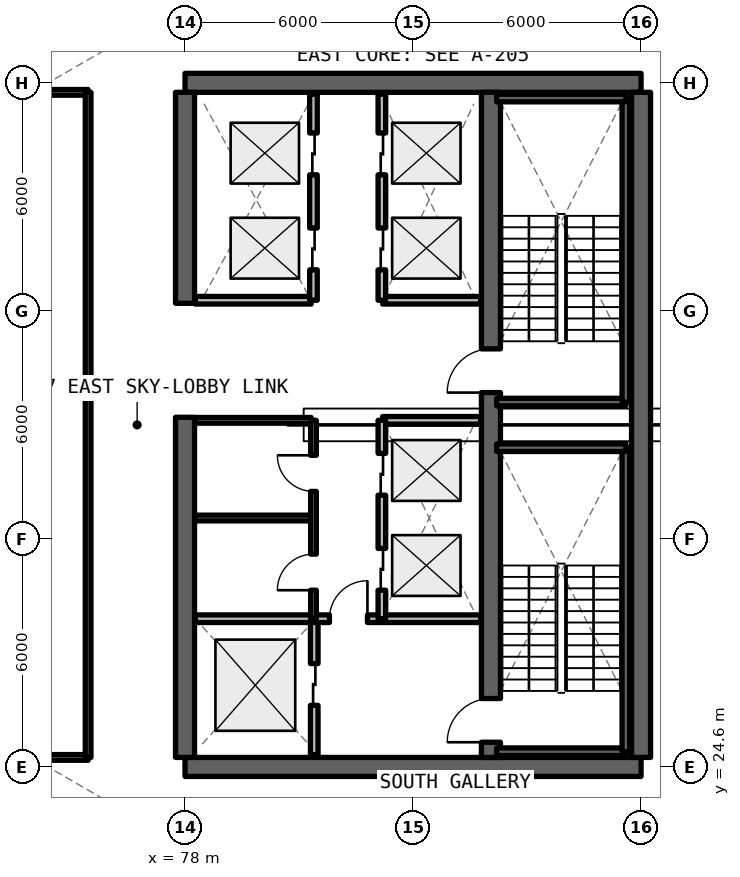
"""IFC4 building model, lengths in metres.
Left out: names, types, materials, properties, quantities, classifications, styles, units other than length and angle.
Written with IfcOpenShell. Run it as: python <this file> out.ifc"""

import sys

from ifc_helpers import new_model, si_unit, direction, frame, frame_2d, origin, place, context, subcontext, project, spatial, rectangle, extrude, element, fill, save


model = new_model("IFC4")
c1 = context("Model", 3, precision=1e-05, world=origin(), true_north=direction((0.0, 1.0)))
c2 = subcontext(c1, "Body", "Model", "MODEL_VIEW")
j1 = project(units=[si_unit("LENGTHUNIT", "METRE"), si_unit("PLANEANGLEUNIT", "RADIAN")], contexts=[c1])
p1 = place(None, origin())
s1 = spatial("IfcSite", under=j1, at=p1, CompositionType="ELEMENT")
p2 = place(p1, origin())
s2 = spatial("IfcBuilding", under=s1, at=p2, CompositionType="ELEMENT")
p3 = place(p2, frame((0.0, 0.0, 78.21)))
s3 = spatial("IfcBuildingStorey", under=s2, at=p3, CompositionType="ELEMENT", Elevation=78.21)
for number, where, z_axis, x_axis in (
    (1, (78.0, 24.6, 0.0), (0.0, 0.0, 1.0), (1.0, 0.0, 0.0)),
    (2, (90.0, 42.6, 0.0), (0.0, 0.0, 1.0), (-1.0, 0.0, 0.0)),
):
    element("IfcWall", number, at=place(p3, frame(where, z_axis=z_axis, x_axis=x_axis)), inside=s3, PredefinedType="SHEAR", context=c2, shape_type="SweptSolid", body=[
        extrude(rectangle(XDim=12.0, YDim=0.5, at=frame_2d((6.0, 0.0))), origin(), (0.0, 0.0, 1.0), 3.96),
    ])
p4 = place(p3, frame((90.0, 24.85, 0.0), z_axis=(0.0, 0.0, 1.0), x_axis=(0.0, 1.0, 0.0)))
e3 = element("IfcWall", 3, at=p4, inside=s3, PredefinedType="SHEAR", context=c2, shape_type="SweptSolid", body=[
    extrude(rectangle(XDim=17.5, YDim=0.5, at=frame_2d((8.75, 0.0))), origin(), (0.0, 0.0, 1.0), 3.96),
])
p5 = place(p3, frame((78.0, 24.85, 0.0), z_axis=(0.0, 0.0, 1.0), x_axis=(0.0, 1.0, 0.0)))
e4 = element("IfcWall", 4, at=p5, inside=s3, PredefinedType="SHEAR", context=c2, shape_type="SweptSolid", body=[
    extrude(rectangle(XDim=8.95, YDim=0.5, at=frame_2d((4.475, 0.0))), origin(), (0.0, 0.0, 1.0), 3.96),
])
p6 = place(p3, frame((78.0, 36.8, 0.0), z_axis=(0.0, 0.0, 1.0), x_axis=(0.0, 1.0, 0.0)))
e5 = element("IfcWall", 5, at=p6, inside=s3, PredefinedType="SHEAR", context=c2, shape_type="SweptSolid", body=[
    extrude(rectangle(XDim=5.55, YDim=0.5, at=frame_2d((2.775, 0.0))), origin(), (0.0, 0.0, 1.0), 3.96),
])
p7 = place(p3, frame((86.05, 24.85, 0.0), z_axis=(0.0, 0.0, 1.0), x_axis=(0.0, 1.0, 0.0)))
e6 = element("IfcWall", 6, at=p7, inside=s3, PredefinedType="SHEAR", context=c2, shape_type="SweptSolid", body=[
    extrude(rectangle(XDim=17.5, YDim=0.5, at=frame_2d((8.75, 0.0))), origin(), (0.0, 0.0, 1.0), 3.96),
])
p8 = place(p7, frame((0.4, 0.0, 0.0)))
e7 = element("IfcOpeningElement", 7, at=p8, cuts=e6, PredefinedType="OPENING", context=c2, shape_type="SweptSolid", body=[
    extrude(rectangle(XDim=1.15, YDim=2.15, at=frame_2d((0.575, 1.075))), frame((0.0, 0.26, 0.0), z_axis=(0.0, -1.0, 0.0), x_axis=(1.0, 0.0, 0.0)), (0.0, 0.0, 1.0), 0.52),
])
p9 = place(p7, frame((9.6, 0.0, 0.0)))
e8 = element("IfcOpeningElement", 8, at=p9, cuts=e6, PredefinedType="OPENING", context=c2, shape_type="SweptSolid", body=[
    extrude(rectangle(XDim=1.15, YDim=2.15, at=frame_2d((0.575, 1.075))), frame((0.0, 0.26, 0.0), z_axis=(0.0, -1.0, 0.0), x_axis=(1.0, 0.0, 0.0)), (0.0, 0.0, 1.0), 0.52),
])
p10 = place(p3, frame((81.4, 24.92, 0.0), z_axis=(0.0, 0.0, 1.0), x_axis=(0.0, 1.0, 0.0)))
e9 = element("IfcWall", 9, at=p10, inside=s3, PredefinedType="SOLIDWALL", context=c2, shape_type="SweptSolid", body=[
    extrude(rectangle(XDim=3.58, YDim=0.2, at=frame_2d((1.79, 0.0))), origin(), (0.0, 0.0, 1.0), 2.96),
])
p11 = place(p10, frame((1.3, 0.0, 0.0)))
e10 = element("IfcOpeningElement", 10, at=p11, cuts=e9, PredefinedType="OPENING", context=c2, shape_type="SweptSolid", body=[
    extrude(rectangle(XDim=1.1, YDim=2.2, at=frame_2d((0.55, 1.1))), frame((0.0, 0.11, 0.0), z_axis=(0.0, -1.0, 0.0), x_axis=(1.0, 0.0, 0.0)), (0.0, 0.0, 1.0), 0.22),
])
p12 = place(p3, frame((78.27, 28.5, 0.0), z_axis=(0.0, 0.0, 1.0), x_axis=(1.0, 0.0, 0.0)))
e11 = element("IfcWall", 11, at=p12, inside=s3, PredefinedType="SOLIDWALL", context=c2, shape_type="SweptSolid", body=[
    extrude(rectangle(XDim=7.51, YDim=0.2, at=frame_2d((3.755, 0.0))), origin(), (0.0, 0.0, 1.0), 2.96),
])
p13 = place(p12, frame((3.53, 0.0, 0.0)))
e12 = element("IfcOpeningElement", 12, at=p13, cuts=e11, PredefinedType="OPENING", context=c2, shape_type="SweptSolid", body=[
    extrude(rectangle(XDim=1.0, YDim=2.15, at=frame_2d((0.5, 1.075))), frame((0.0, 0.11, 0.0), z_axis=(0.0, -1.0, 0.0), x_axis=(1.0, 0.0, 0.0)), (0.0, 0.0, 1.0), 0.22),
])
p14 = place(p3, frame((83.2, 33.72, 0.0), z_axis=(0.0, 0.0, 1.0), x_axis=(1.0, 0.0, 0.0)))
e13 = element("IfcWall", 13, at=p14, inside=s3, PredefinedType="SOLIDWALL", context=c2, shape_type="SweptSolid", body=[
    extrude(rectangle(XDim=2.58, YDim=0.2, at=frame_2d((1.29, 0.0))), origin(), (0.0, 0.0, 1.0), 2.96),
])
p15 = place(p3, frame((83.18, 28.5, 0.0), z_axis=(0.0, 0.0, 1.0), x_axis=(0.0, 1.0, 0.0)))
e14 = element("IfcWall", 14, at=p15, inside=s3, PredefinedType="SOLIDWALL", context=c2, shape_type="SweptSolid", body=[
    extrude(rectangle(XDim=5.22, YDim=0.2, at=frame_2d((2.61, 0.0))), origin(), (0.0, 0.0, 1.0), 2.96),
])
p16 = place(p15, frame((0.75, 0.0, 0.0)))
e15 = element("IfcOpeningElement", 15, at=p16, cuts=e14, PredefinedType="OPENING", context=c2, shape_type="SweptSolid", body=[
    extrude(rectangle(XDim=1.1, YDim=2.2, at=frame_2d((0.55, 1.1))), frame((0.0, 0.11, 0.0), z_axis=(0.0, -1.0, 0.0), x_axis=(1.0, 0.0, 0.0)), (0.0, 0.0, 1.0), 0.22),
])
p17 = place(p15, frame((3.25, 0.0, 0.0)))
e16 = element("IfcOpeningElement", 16, at=p17, cuts=e14, PredefinedType="OPENING", context=c2, shape_type="SweptSolid", body=[
    extrude(rectangle(XDim=1.1, YDim=2.2, at=frame_2d((0.55, 1.1))), frame((0.0, 0.11, 0.0), z_axis=(0.0, -1.0, 0.0), x_axis=(1.0, 0.0, 0.0)), (0.0, 0.0, 1.0), 0.22),
])
for number, where, z_axis, x_axis in (
    (17, (78.27, 31.15, 0.0), (0.0, 0.0, 1.0), (1.0, 0.0, 0.0)),
    (18, (78.27, 33.72, 0.0), (0.0, 0.0, 1.0), (1.0, 0.0, 0.0)),
):
    element("IfcWall", number, at=place(p3, frame(where, z_axis=z_axis, x_axis=x_axis)), inside=s3, PredefinedType="SOLIDWALL", context=c2, shape_type="SweptSolid", body=[
        extrude(rectangle(XDim=3.05, YDim=0.15, at=frame_2d((1.525, 0.0))), origin(), (0.0, 0.0, 1.0), 2.96),
    ])
p18 = place(p3, frame((81.38, 28.5, 0.0), z_axis=(0.0, 0.0, 1.0), x_axis=(0.0, 1.0, 0.0)))
e19 = element("IfcWall", 19, at=p18, inside=s3, PredefinedType="SOLIDWALL", context=c2, shape_type="SweptSolid", body=[
    extrude(rectangle(XDim=5.22, YDim=0.15, at=frame_2d((2.61, 0.0))), origin(), (0.0, 0.0, 1.0), 2.96),
])
p19 = place(p18, frame((0.75, 0.0, 0.0)))
e20 = element("IfcOpeningElement", 20, at=p19, cuts=e19, PredefinedType="OPENING", context=c2, shape_type="SweptSolid", body=[
    extrude(rectangle(XDim=0.95, YDim=2.15, at=frame_2d((0.475, 1.075))), frame((0.0, 0.085, 0.0), z_axis=(0.0, -1.0, 0.0), x_axis=(1.0, 0.0, 0.0)), (0.0, 0.0, 1.0), 0.17),
])
p20 = place(p18, frame((3.35, 0.0, 0.0)))
e21 = element("IfcOpeningElement", 21, at=p20, cuts=e19, PredefinedType="OPENING", context=c2, shape_type="SweptSolid", body=[
    extrude(rectangle(XDim=0.95, YDim=2.15, at=frame_2d((0.475, 1.075))), frame((0.0, 0.085, 0.0), z_axis=(0.0, -1.0, 0.0), x_axis=(1.0, 0.0, 0.0)), (0.0, 0.0, 1.0), 0.17),
])
p21 = place(p3, frame((83.2, 36.88, 0.0), z_axis=(0.0, 0.0, 1.0), x_axis=(1.0, 0.0, 0.0)))
e22 = element("IfcWall", 22, at=p21, inside=s3, PredefinedType="SOLIDWALL", context=c2, shape_type="SweptSolid", body=[
    extrude(rectangle(XDim=2.58, YDim=0.2, at=frame_2d((1.29, 0.0))), origin(), (0.0, 0.0, 1.0), 2.96),
])
p22 = place(p3, frame((83.18, 36.88, 0.0), z_axis=(0.0, 0.0, 1.0), x_axis=(0.0, 1.0, 0.0)))
e23 = element("IfcWall", 23, at=p22, inside=s3, PredefinedType="SOLIDWALL", context=c2, shape_type="SweptSolid", body=[
    extrude(rectangle(XDim=5.42, YDim=0.2, at=frame_2d((2.71, 0.0))), origin(), (0.0, 0.0, 1.0), 2.96),
])
p23 = place(p22, frame((0.8, 0.0, 0.0)))
e24 = element("IfcOpeningElement", 24, at=p23, cuts=e23, PredefinedType="OPENING", context=c2, shape_type="SweptSolid", body=[
    extrude(rectangle(XDim=1.1, YDim=2.2, at=frame_2d((0.55, 1.1))), frame((0.0, 0.11, 0.0), z_axis=(0.0, -1.0, 0.0), x_axis=(1.0, 0.0, 0.0)), (0.0, 0.0, 1.0), 0.22),
])
p24 = place(p22, frame((3.3, 0.0, 0.0)))
e25 = element("IfcOpeningElement", 25, at=p24, cuts=e23, PredefinedType="OPENING", context=c2, shape_type="SweptSolid", body=[
    extrude(rectangle(XDim=1.1, YDim=2.2, at=frame_2d((0.55, 1.1))), frame((0.0, 0.11, 0.0), z_axis=(0.0, -1.0, 0.0), x_axis=(1.0, 0.0, 0.0)), (0.0, 0.0, 1.0), 0.22),
])
p25 = place(p3, frame((78.27, 36.88, 0.0), z_axis=(0.0, 0.0, 1.0), x_axis=(1.0, 0.0, 0.0)))
e26 = element("IfcWall", 26, at=p25, inside=s3, PredefinedType="SOLIDWALL", context=c2, shape_type="SweptSolid", body=[
    extrude(rectangle(XDim=3.05, YDim=0.2, at=frame_2d((1.525, 0.0))), origin(), (0.0, 0.0, 1.0), 2.96),
])
p26 = place(p3, frame((81.38, 36.88, 0.0), z_axis=(0.0, 0.0, 1.0), x_axis=(0.0, 1.0, 0.0)))
e27 = element("IfcWall", 27, at=p26, inside=s3, PredefinedType="SOLIDWALL", context=c2, shape_type="SweptSolid", body=[
    extrude(rectangle(XDim=5.42, YDim=0.2, at=frame_2d((2.71, 0.0))), origin(), (0.0, 0.0, 1.0), 2.96),
])
p27 = place(p26, frame((0.8, 0.0, 0.0)))
e28 = element("IfcOpeningElement", 28, at=p27, cuts=e27, PredefinedType="OPENING", context=c2, shape_type="SweptSolid", body=[
    extrude(rectangle(XDim=1.1, YDim=2.2, at=frame_2d((0.55, 1.1))), frame((0.0, 0.11, 0.0), z_axis=(0.0, -1.0, 0.0), x_axis=(1.0, 0.0, 0.0)), (0.0, 0.0, 1.0), 0.22),
])
p28 = place(p26, frame((3.3, 0.0, 0.0)))
e29 = element("IfcOpeningElement", 29, at=p28, cuts=e27, PredefinedType="OPENING", context=c2, shape_type="SweptSolid", body=[
    extrude(rectangle(XDim=1.1, YDim=2.2, at=frame_2d((0.55, 1.1))), frame((0.0, 0.11, 0.0), z_axis=(0.0, -1.0, 0.0), x_axis=(1.0, 0.0, 0.0)), (0.0, 0.0, 1.0), 0.22),
])
for number, where, z_axis, x_axis in (
    (30, (38.55, 24.85, 0.0), (0.0, 0.0, 1.0), (1.0, 0.0, 0.0)),
    (31, (38.55, 42.35, 0.0), (0.0, 0.0, 1.0), (1.0, 0.0, 0.0)),
):
    element("IfcWall", number, at=place(p3, frame(where, z_axis=z_axis, x_axis=x_axis)), inside=s3, PredefinedType="SOLIDWALL", context=c2, shape_type="SweptSolid", body=[
        extrude(rectangle(XDim=36.9, YDim=0.15, at=frame_2d((18.45, 0.0))), origin(), (0.0, 0.0, 1.0), 2.96),
    ])
p29 = place(p3, frame((75.45, 24.85, 0.0), z_axis=(0.0, 0.0, 1.0), x_axis=(0.0, 1.0, 0.0)))
e32 = element("IfcWall", 32, at=p29, inside=s3, PredefinedType="SOLIDWALL", context=c2, shape_type="SweptSolid", body=[
    extrude(rectangle(XDim=17.5, YDim=0.15, at=frame_2d((8.75, 0.0))), origin(), (0.0, 0.0, 1.0), 2.96),
])
p30 = place(p3, frame((86.2, 25.0, 0.0), z_axis=(0.0, 0.0, 1.0), x_axis=(1.0, 0.0, 0.0)))
e33 = element("IfcWall", 33, at=p30, inside=s3, PredefinedType="SOLIDWALL", context=c2, shape_type="SweptSolid", body=[
    extrude(rectangle(XDim=3.4, YDim=0.2, at=frame_2d((1.7, 0.0))), origin(), (0.0, 0.0, 1.0), 3.96),
])
p31 = place(p3, frame((89.6, 25.0, 0.0), z_axis=(0.0, 0.0, 1.0), x_axis=(0.0, 1.0, 0.0)))
e34 = element("IfcWall", 34, at=p31, inside=s3, PredefinedType="SOLIDWALL", context=c2, shape_type="SweptSolid", body=[
    extrude(rectangle(XDim=8.0, YDim=0.2, at=frame_2d((4.0, 0.0))), origin(), (0.0, 0.0, 1.0), 3.96),
])
for number, where, z_axis, x_axis in (
    (35, (89.6, 33.0, 0.0), (0.0, 0.0, 1.0), (-1.0, 0.0, 0.0)),
    (36, (86.2, 34.2, 0.0), (0.0, 0.0, 1.0), (1.0, 0.0, 0.0)),
):
    element("IfcWall", number, at=place(p3, frame(where, z_axis=z_axis, x_axis=x_axis)), inside=s3, PredefinedType="SOLIDWALL", context=c2, shape_type="SweptSolid", body=[
        extrude(rectangle(XDim=3.4, YDim=0.2, at=frame_2d((1.7, 0.0))), origin(), (0.0, 0.0, 1.0), 3.96),
    ])
p32 = place(p3, frame((89.6, 34.2, 0.0), z_axis=(0.0, 0.0, 1.0), x_axis=(0.0, 1.0, 0.0)))
e37 = element("IfcWall", 37, at=p32, inside=s3, PredefinedType="SOLIDWALL", context=c2, shape_type="SweptSolid", body=[
    extrude(rectangle(XDim=8.0, YDim=0.2, at=frame_2d((4.0, 0.0))), origin(), (0.0, 0.0, 1.0), 3.96),
])
p33 = place(p3, frame((89.6, 42.2, 0.0), z_axis=(0.0, 0.0, 1.0), x_axis=(-1.0, 0.0, 0.0)))
e38 = element("IfcWall", 38, at=p33, inside=s3, PredefinedType="SOLIDWALL", context=c2, shape_type="SweptSolid", body=[
    extrude(rectangle(XDim=3.4, YDim=0.2, at=frame_2d((1.7, 0.0))), origin(), (0.0, 0.0, 1.0), 3.96),
])
p34 = place(p11, origin())
e39 = element("IfcDoor", 39, at=p34, inside=s3, OperationType="SLIDING_TO_LEFT", PredefinedType="DOOR", context=c2, shape_type="SweptSolid", body=[
    extrude(rectangle(XDim=1.1, YDim=2.2, at=frame_2d((0.55, 1.1))), frame((0.0, 0.025, 0.0), z_axis=(0.0, -1.0, 0.0), x_axis=(1.0, 0.0, 0.0)), (0.0, 0.0, 1.0), 0.05),
])
fill(e10, e39)
p35 = place(p13, origin())
e40 = element("IfcDoor", 40, at=p35, inside=s3, OperationType="SINGLE_SWING_RIGHT", PredefinedType="DOOR", context=c2, shape_type="SweptSolid", body=[
    extrude(rectangle(XDim=1.0, YDim=2.15, at=frame_2d((0.5, 1.075))), frame((0.0, 0.025, 0.0), z_axis=(0.0, -1.0, 0.0), x_axis=(1.0, 0.0, 0.0)), (0.0, 0.0, 1.0), 0.05),
])
fill(e12, e40)
p36 = place(p16, origin())
e41 = element("IfcDoor", 41, at=p36, inside=s3, OperationType="SLIDING_TO_LEFT", PredefinedType="DOOR", context=c2, shape_type="SweptSolid", body=[
    extrude(rectangle(XDim=1.1, YDim=2.2, at=frame_2d((0.55, 1.1))), frame((0.0, 0.025, 0.0), z_axis=(0.0, -1.0, 0.0), x_axis=(1.0, 0.0, 0.0)), (0.0, 0.0, 1.0), 0.05),
])
fill(e15, e41)
p37 = place(p17, origin())
e42 = element("IfcDoor", 42, at=p37, inside=s3, OperationType="SLIDING_TO_RIGHT", PredefinedType="DOOR", context=c2, shape_type="SweptSolid", body=[
    extrude(rectangle(XDim=1.1, YDim=2.2, at=frame_2d((0.55, 1.1))), frame((0.0, 0.025, 0.0), z_axis=(0.0, -1.0, 0.0), x_axis=(1.0, 0.0, 0.0)), (0.0, 0.0, 1.0), 0.05),
])
fill(e16, e42)
p38 = place(p19, origin())
e43 = element("IfcDoor", 43, at=p38, inside=s3, OperationType="SINGLE_SWING_LEFT", PredefinedType="DOOR", context=c2, shape_type="SweptSolid", body=[
    extrude(rectangle(XDim=0.95, YDim=2.15, at=frame_2d((0.475, 1.075))), frame((0.0, 0.025, 0.0), z_axis=(0.0, -1.0, 0.0), x_axis=(1.0, 0.0, 0.0)), (0.0, 0.0, 1.0), 0.05),
])
fill(e20, e43)
p39 = place(p20, origin())
e44 = element("IfcDoor", 44, at=p39, inside=s3, OperationType="SINGLE_SWING_RIGHT", PredefinedType="DOOR", context=c2, shape_type="SweptSolid", body=[
    extrude(rectangle(XDim=0.95, YDim=2.15, at=frame_2d((0.475, 1.075))), frame((0.0, 0.025, 0.0), z_axis=(0.0, -1.0, 0.0), x_axis=(1.0, 0.0, 0.0)), (0.0, 0.0, 1.0), 0.05),
])
fill(e21, e44)
p40 = place(p23, origin())
e45 = element("IfcDoor", 45, at=p40, inside=s3, OperationType="SLIDING_TO_LEFT", PredefinedType="DOOR", context=c2, shape_type="SweptSolid", body=[
    extrude(rectangle(XDim=1.1, YDim=2.2, at=frame_2d((0.55, 1.1))), frame((0.0, 0.025, 0.0), z_axis=(0.0, -1.0, 0.0), x_axis=(1.0, 0.0, 0.0)), (0.0, 0.0, 1.0), 0.05),
])
fill(e24, e45)
p41 = place(p24, origin())
e46 = element("IfcDoor", 46, at=p41, inside=s3, OperationType="SLIDING_TO_RIGHT", PredefinedType="DOOR", context=c2, shape_type="SweptSolid", body=[
    extrude(rectangle(XDim=1.1, YDim=2.2, at=frame_2d((0.55, 1.1))), frame((0.0, 0.025, 0.0), z_axis=(0.0, -1.0, 0.0), x_axis=(1.0, 0.0, 0.0)), (0.0, 0.0, 1.0), 0.05),
])
fill(e25, e46)
p42 = place(p27, origin())
e47 = element("IfcDoor", 47, at=p42, inside=s3, OperationType="SLIDING_TO_LEFT", PredefinedType="DOOR", context=c2, shape_type="SweptSolid", body=[
    extrude(rectangle(XDim=1.1, YDim=2.2, at=frame_2d((0.55, 1.1))), frame((0.0, 0.025, 0.0), z_axis=(0.0, -1.0, 0.0), x_axis=(1.0, 0.0, 0.0)), (0.0, 0.0, 1.0), 0.05),
])
fill(e28, e47)
p43 = place(p28, origin())
e48 = element("IfcDoor", 48, at=p43, inside=s3, OperationType="SLIDING_TO_RIGHT", PredefinedType="DOOR", context=c2, shape_type="SweptSolid", body=[
    extrude(rectangle(XDim=1.1, YDim=2.2, at=frame_2d((0.55, 1.1))), frame((0.0, 0.025, 0.0), z_axis=(0.0, -1.0, 0.0), x_axis=(1.0, 0.0, 0.0)), (0.0, 0.0, 1.0), 0.05),
])
fill(e29, e48)
p44 = place(p8, origin())
e49 = element("IfcDoor", 49, at=p44, inside=s3, OperationType="SINGLE_SWING_LEFT", PredefinedType="DOOR", context=c2, shape_type="SweptSolid", body=[
    extrude(rectangle(XDim=1.15, YDim=2.15, at=frame_2d((0.575, 1.075))), frame((0.0, 0.025, 0.0), z_axis=(0.0, -1.0, 0.0), x_axis=(1.0, 0.0, 0.0)), (0.0, 0.0, 1.0), 0.05),
])
fill(e7, e49)
p45 = place(p9, origin())
e50 = element("IfcDoor", 50, at=p45, inside=s3, OperationType="SINGLE_SWING_RIGHT", PredefinedType="DOOR", context=c2, shape_type="SweptSolid", body=[
    extrude(rectangle(XDim=1.15, YDim=2.15, at=frame_2d((0.575, 1.075))), frame((0.0, 0.025, 0.0), z_axis=(0.0, -1.0, 0.0), x_axis=(1.0, 0.0, 0.0)), (0.0, 0.0, 1.0), 0.05),
])
fill(e8, e50)
save(model, sys.argv[1])
